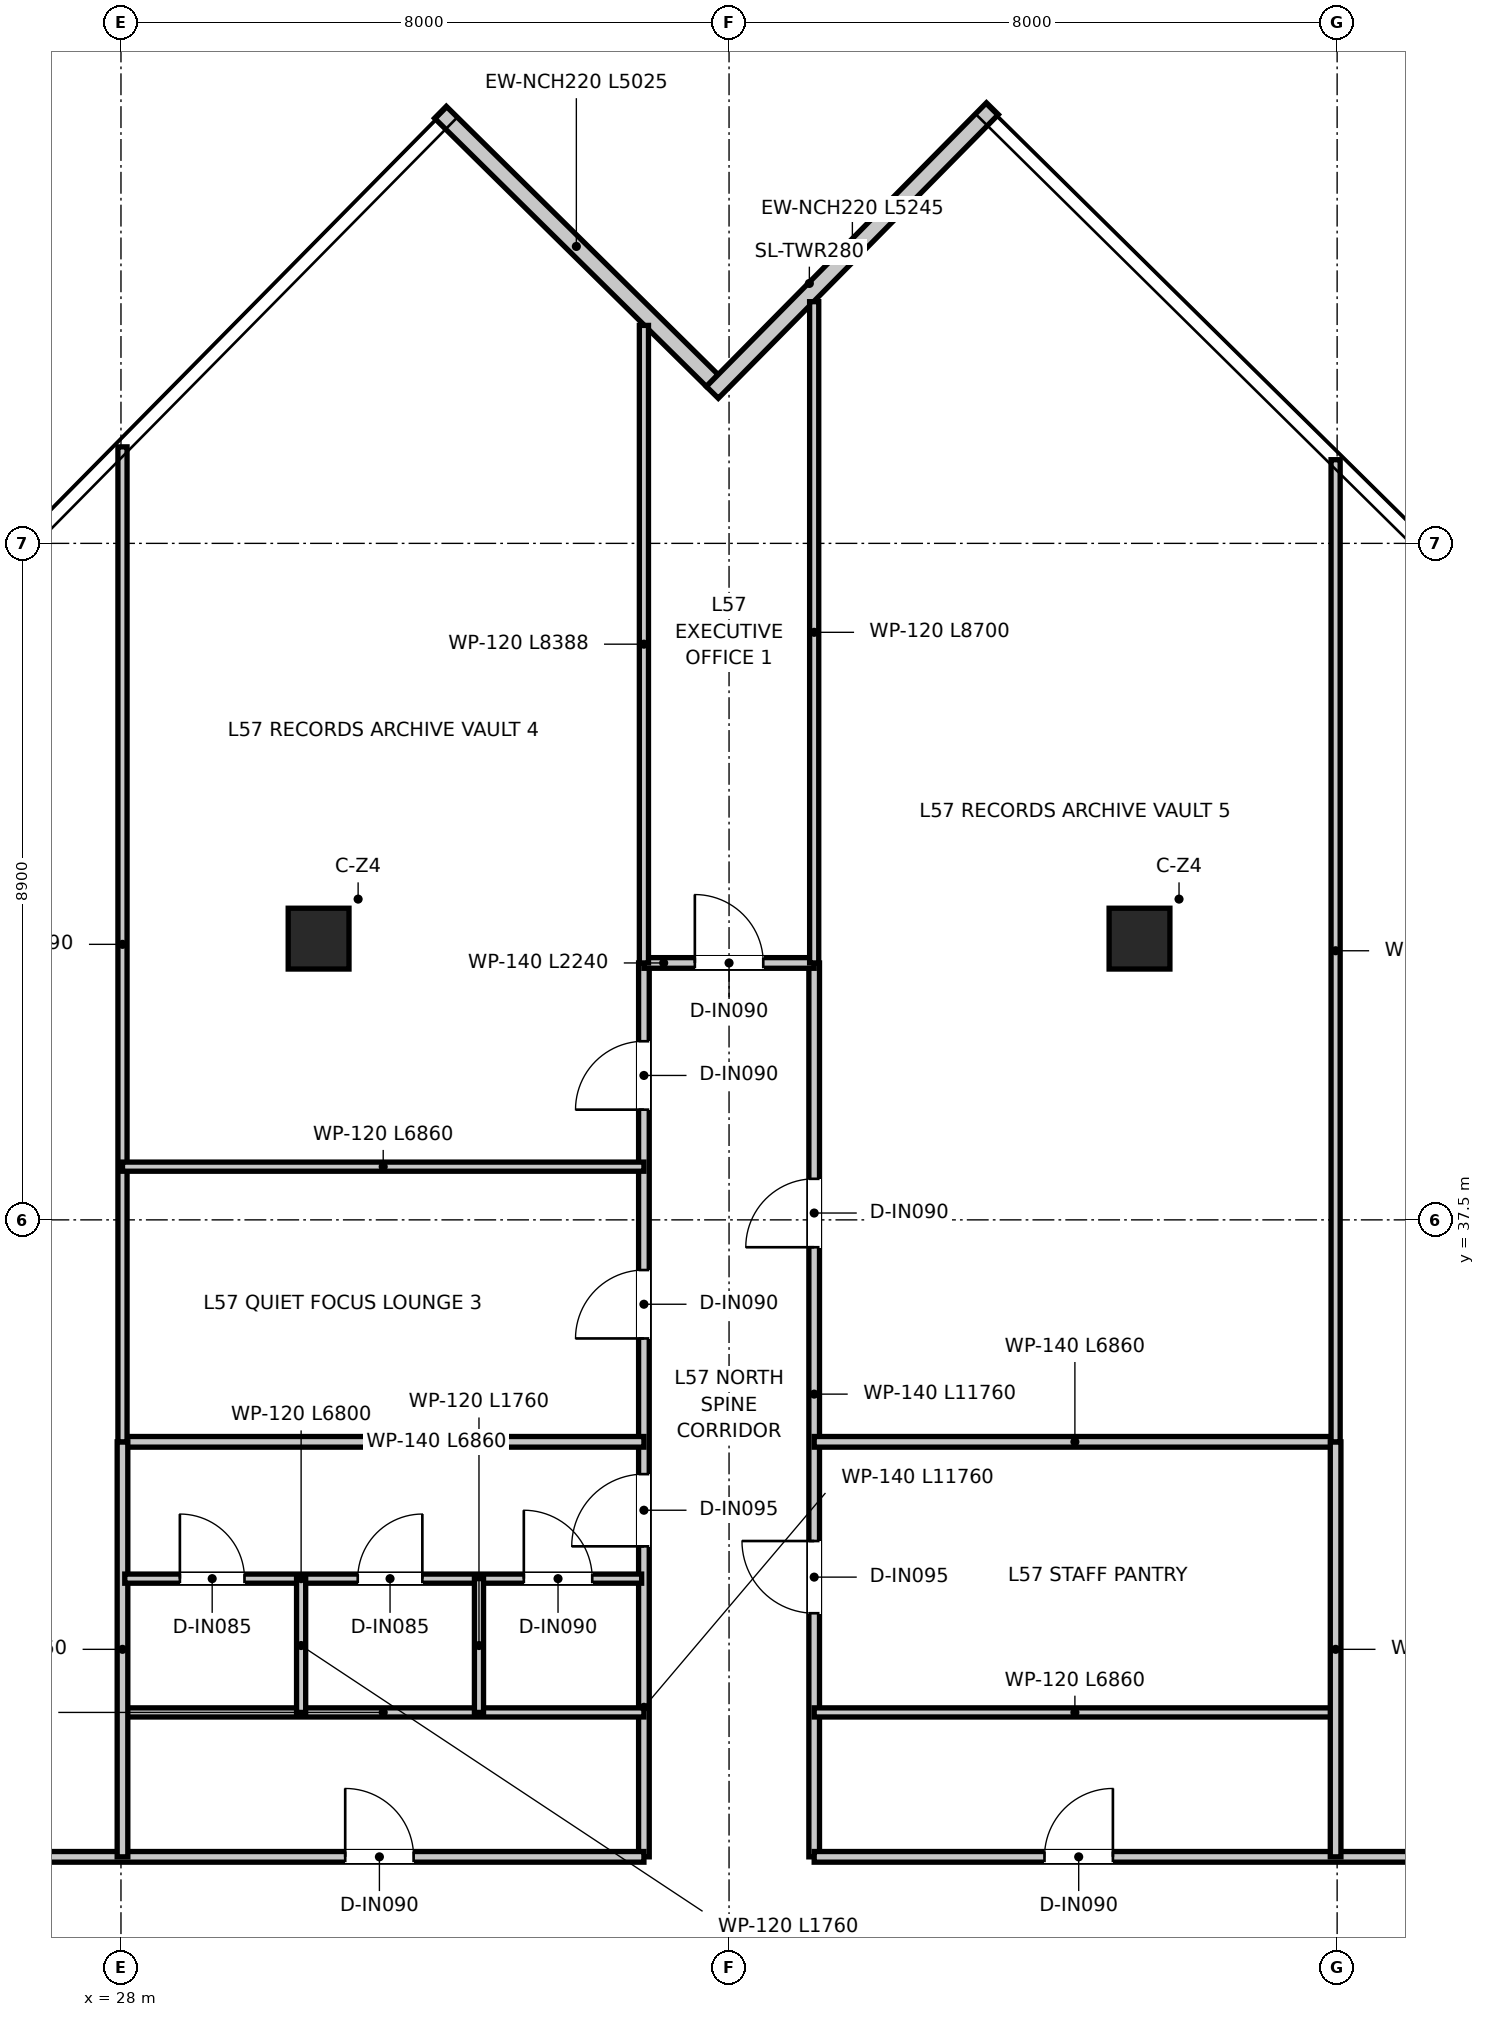
"""IFC4 building model, lengths in metres.
Left out: names, types, materials, properties, quantities, classifications, styles, units other than length and angle.
Written with IfcOpenShell. Run it as: python <this file> out.ifc"""

import sys

from ifc_helpers import new_model, si_unit, direction, frame, frame_2d, origin, origin_2d, place, context, subcontext, project, spatial, rectangle, extrude, source, transform, mapped, element, fill, save


model = new_model("IFC4")
c1 = context("Model", 3, precision=1e-05, world=origin(), true_north=direction((0.0, 1.0)))
c2 = subcontext(c1, "Body", "Model", "MODEL_VIEW")
j1 = project(units=[si_unit("LENGTHUNIT", "METRE"), si_unit("PLANEANGLEUNIT", "RADIAN")], contexts=[c1])
p1 = place(None, origin())
s1 = spatial("IfcSite", under=j1, at=p1, CompositionType="ELEMENT")
p2 = place(p1, origin())
s2 = spatial("IfcBuilding", under=s1, at=p2, CompositionType="ELEMENT")
p3 = place(p2, frame((0.0, 0.0, 234.95)))
s3 = spatial("IfcBuildingStorey", under=s2, at=p3, CompositionType="ELEMENT", Elevation=234.95)
m1 = source(origin(), c2, "Body", "SweptSolid", [
    extrude(rectangle(XDim=0.8, YDim=0.8, at=origin_2d()), origin(), (0.0, 0.0, 1.0), 3.95),
])
for number, where, z_axis, x_axis in (
    (1, (30.6, 41.2, 0.0), (0.0, 0.0, 1.0), (1.0, 0.0, 0.0)),
    (2, (41.4, 41.2, 0.0), (0.0, 0.0, 1.0), (1.0, 0.0, 0.0)),
):
    element("IfcColumn", number, at=place(p3, frame(where, z_axis=z_axis, x_axis=x_axis)), inside=s3, PredefinedType="COLUMN", context=c2, shape_type="MappedRepresentation", body=[
        mapped(m1, transform((0.0, 0.0, 0.0), x_axis=(1.0, 0.0, 0.0), y_axis=(0.0, 1.0, 0.0), z_axis=(0.0, 0.0, 1.0), scale=1.0)),
    ])
p4 = place(p3, frame((35.779, 48.542, 0.0), z_axis=(0.0, 0.0, 1.0), x_axis=(-0.711707198953, 0.70247623658, 0.0)))
e3 = element("IfcWall", 3, at=p4, inside=s3, PredefinedType="ELEMENTEDWALL", context=c2, shape_type="SweptSolid", body=[
    extrude(rectangle(XDim=5.025, YDim=0.22, at=frame_2d((2.513, 0.0))), origin(), (0.0, 0.0, 1.0), 3.67),
])
p5 = place(p3, frame((39.465, 52.119, 0.0), z_axis=(0.0, 0.0, 1.0), x_axis=(-0.702460059039, -0.711723166305, 0.0)))
e4 = element("IfcWall", 4, at=p5, inside=s3, PredefinedType="ELEMENTEDWALL", context=c2, shape_type="SweptSolid", body=[
    extrude(rectangle(XDim=5.245, YDim=0.22, at=frame_2d((2.623, 0.0))), origin(), (0.0, 0.0, 1.0), 3.67),
])
p6 = place(p3, frame((34.88, 29.12, 0.0), z_axis=(0.0, 0.0, 1.0), x_axis=(0.0, 1.0, 0.0)))
e5 = element("IfcWall", 5, at=p6, inside=s3, PredefinedType="PARTITIONING", context=c2, shape_type="SweptSolid", body=[
    extrude(rectangle(XDim=11.76, YDim=0.14, at=frame_2d((5.88, 0.0))), origin(), (0.0, 0.0, 1.0), 3.03),
])
p7 = place(p6, frame((4.085, 0.0, 0.0)))
e6 = element("IfcOpeningElement", 6, at=p7, cuts=e5, PredefinedType="OPENING", context=c2, shape_type="SweptSolid", body=[
    extrude(rectangle(XDim=0.95, YDim=2.1, at=frame_2d((0.475, 1.05))), frame((0.0, 0.08, 0.0), z_axis=(0.0, -1.0, 0.0), x_axis=(1.0, 0.0, 0.0)), (0.0, 0.0, 1.0), 0.16),
])
p8 = place(p6, frame((6.82, 0.0, 0.0)))
e7 = element("IfcOpeningElement", 7, at=p8, cuts=e5, PredefinedType="OPENING", context=c2, shape_type="SweptSolid", body=[
    extrude(rectangle(XDim=0.9, YDim=2.1, at=frame_2d((0.45, 1.05))), frame((0.0, 0.08, 0.0), z_axis=(0.0, -1.0, 0.0), x_axis=(1.0, 0.0, 0.0)), (0.0, 0.0, 1.0), 0.16),
])
p9 = place(p6, frame((9.83, 0.0, 0.0)))
e8 = element("IfcOpeningElement", 8, at=p9, cuts=e5, PredefinedType="OPENING", context=c2, shape_type="SweptSolid", body=[
    extrude(rectangle(XDim=0.9, YDim=2.1, at=frame_2d((0.45, 1.05))), frame((0.0, 0.08, 0.0), z_axis=(0.0, -1.0, 0.0), x_axis=(1.0, 0.0, 0.0)), (0.0, 0.0, 1.0), 0.16),
])
p10 = place(p3, frame((37.12, 29.12, 0.0), z_axis=(0.0, 0.0, 1.0), x_axis=(0.0, 1.0, 0.0)))
e9 = element("IfcWall", 9, at=p10, inside=s3, PredefinedType="PARTITIONING", context=c2, shape_type="SweptSolid", body=[
    extrude(rectangle(XDim=11.76, YDim=0.14, at=frame_2d((5.88, 0.0))), origin(), (0.0, 0.0, 1.0), 3.03),
])
p11 = place(p10, frame((3.205, 0.0, 0.0)))
e10 = element("IfcOpeningElement", 10, at=p11, cuts=e9, PredefinedType="OPENING", context=c2, shape_type="SweptSolid", body=[
    extrude(rectangle(XDim=0.95, YDim=2.1, at=frame_2d((0.475, 1.05))), frame((0.0, 0.08, 0.0), z_axis=(0.0, -1.0, 0.0), x_axis=(1.0, 0.0, 0.0)), (0.0, 0.0, 1.0), 0.16),
])
p12 = place(p10, frame((8.02, 0.0, 0.0)))
e11 = element("IfcOpeningElement", 11, at=p12, cuts=e9, PredefinedType="OPENING", context=c2, shape_type="SweptSolid", body=[
    extrude(rectangle(XDim=0.9, YDim=2.1, at=frame_2d((0.45, 1.05))), frame((0.0, 0.08, 0.0), z_axis=(0.0, -1.0, 0.0), x_axis=(1.0, 0.0, 0.0)), (0.0, 0.0, 1.0), 0.16),
])
p13 = place(p3, frame((34.88, 40.88, 0.0), z_axis=(0.0, 0.0, 1.0), x_axis=(1.0, 0.0, 0.0)))
e12 = element("IfcWall", 12, at=p13, inside=s3, PredefinedType="PARTITIONING", context=c2, shape_type="SweptSolid", body=[
    extrude(rectangle(XDim=2.24, YDim=0.14, at=frame_2d((1.12, 0.0))), origin(), (0.0, 0.0, 1.0), 3.67),
])
p14 = place(p13, frame((0.67, 0.0, 0.0)))
e13 = element("IfcOpeningElement", 13, at=p14, cuts=e12, PredefinedType="OPENING", context=c2, shape_type="SweptSolid", body=[
    extrude(rectangle(XDim=0.9, YDim=2.1, at=frame_2d((0.45, 1.05))), frame((0.0, 0.08, 0.0), z_axis=(0.0, -1.0, 0.0), x_axis=(1.0, 0.0, 0.0)), (0.0, 0.0, 1.0), 0.16),
])
p15 = place(p3, frame((11.803, 29.12, 0.0), z_axis=(0.0, 0.0, 1.0), x_axis=(1.0, 0.0, 0.0)))
e14 = element("IfcWall", 14, at=p15, inside=s3, PredefinedType="PARTITIONING", context=c2, shape_type="SweptSolid", body=[
    extrude(rectangle(XDim=23.077, YDim=0.14, at=frame_2d((11.538, 0.0))), origin(), (0.0, 0.0, 1.0), 3.03),
])
p16 = place(p15, frame((19.147, 0.0, 0.0)))
e15 = element("IfcOpeningElement", 15, at=p16, cuts=e14, PredefinedType="OPENING", context=c2, shape_type="SweptSolid", body=[
    extrude(rectangle(XDim=0.9, YDim=2.1, at=frame_2d((0.45, 1.05))), frame((0.0, 0.08, 0.0), z_axis=(0.0, -1.0, 0.0), x_axis=(1.0, 0.0, 0.0)), (0.0, 0.0, 1.0), 0.16),
])
p17 = place(p15, frame((7.363, 0.0, 0.0)))
e16 = element("IfcOpeningElement", 16, at=p17, cuts=e14, PredefinedType="OPENING", context=c2, shape_type="SweptSolid", body=[
    extrude(rectangle(XDim=0.9, YDim=2.1, at=frame_2d((0.45, 1.05))), frame((0.0, 0.08, 0.0), z_axis=(0.0, -1.0, 0.0), x_axis=(1.0, 0.0, 0.0)), (0.0, 0.0, 1.0), 0.16),
])
p18 = place(p3, frame((37.12, 29.12, 0.0), z_axis=(0.0, 0.0, 1.0), x_axis=(1.0, 0.0, 0.0)))
e17 = element("IfcWall", 17, at=p18, inside=s3, PredefinedType="PARTITIONING", context=c2, shape_type="SweptSolid", body=[
    extrude(rectangle(XDim=22.73, YDim=0.14, at=frame_2d((11.365, 0.0))), origin(), (0.0, 0.0, 1.0), 3.03),
])
p19 = place(p18, frame((3.03, 0.0, 0.0)))
e18 = element("IfcOpeningElement", 18, at=p19, cuts=e17, PredefinedType="OPENING", context=c2, shape_type="SweptSolid", body=[
    extrude(rectangle(XDim=0.9, YDim=2.1, at=frame_2d((0.45, 1.05))), frame((0.0, 0.08, 0.0), z_axis=(0.0, -1.0, 0.0), x_axis=(1.0, 0.0, 0.0)), (0.0, 0.0, 1.0), 0.16),
])
p20 = place(p18, frame((14.604, 0.0, 0.0)))
e19 = element("IfcOpeningElement", 19, at=p20, cuts=e17, PredefinedType="OPENING", context=c2, shape_type="SweptSolid", body=[
    extrude(rectangle(XDim=0.9, YDim=2.1, at=frame_2d((0.45, 1.05))), frame((0.0, 0.08, 0.0), z_axis=(0.0, -1.0, 0.0), x_axis=(1.0, 0.0, 0.0)), (0.0, 0.0, 1.0), 0.16),
])
for number, where, z_axis, x_axis in (
    (20, (28.02, 31.02, 0.0), (0.0, 0.0, 1.0), (1.0, 0.0, 0.0)),
    (21, (37.12, 31.02, 0.0), (0.0, 0.0, 1.0), (1.0, 0.0, 0.0)),
):
    element("IfcWall", number, at=place(p3, frame(where, z_axis=z_axis, x_axis=x_axis)), inside=s3, PredefinedType="PARTITIONING", context=c2, shape_type="SweptSolid", body=[
        extrude(rectangle(XDim=6.86, YDim=0.12, at=frame_2d((3.43, 0.0))), origin(), (0.0, 0.0, 1.0), 3.18),
    ])
for number, where, z_axis, x_axis in (
    (22, (28.02, 34.58, 0.0), (0.0, 0.0, 1.0), (1.0, 0.0, 0.0)),
    (23, (37.12, 34.58, 0.0), (0.0, 0.0, 1.0), (1.0, 0.0, 0.0)),
):
    element("IfcWall", number, at=place(p3, frame(where, z_axis=z_axis, x_axis=x_axis)), inside=s3, PredefinedType="PARTITIONING", context=c2, shape_type="SweptSolid", body=[
        extrude(rectangle(XDim=6.86, YDim=0.14, at=frame_2d((3.43, 0.0))), origin(), (0.0, 0.0, 1.0), 3.18),
    ])
for number, where, z_axis, x_axis in (
    (24, (28.02, 29.12, 0.0), (0.0, 0.0, 1.0), (0.0, 1.0, 0.0)),
    (25, (43.98, 29.12, 0.0), (0.0, 0.0, 1.0), (0.0, 1.0, 0.0)),
):
    element("IfcWall", number, at=place(p3, frame(where, z_axis=z_axis, x_axis=x_axis)), inside=s3, PredefinedType="PARTITIONING", context=c2, shape_type="SweptSolid", body=[
        extrude(rectangle(XDim=5.46, YDim=0.14, at=frame_2d((2.73, 0.0))), origin(), (0.0, 0.0, 1.0), 3.37),
    ])
p21 = place(p3, frame((28.05, 32.78, 0.0), z_axis=(0.0, 0.0, 1.0), x_axis=(1.0, 0.0, 0.0)))
e26 = element("IfcWall", 26, at=p21, inside=s3, PredefinedType="PARTITIONING", context=c2, shape_type="SweptSolid", body=[
    extrude(rectangle(XDim=6.8, YDim=0.12, at=frame_2d((3.4, 0.0))), origin(), (0.0, 0.0, 1.0), 3.18),
])
p22 = place(p21, frame((0.725, 0.0, 0.0)))
e27 = element("IfcOpeningElement", 27, at=p22, cuts=e26, PredefinedType="OPENING", context=c2, shape_type="SweptSolid", body=[
    extrude(rectangle(XDim=0.85, YDim=2.1, at=frame_2d((0.425, 1.05))), frame((0.0, 0.07, 0.0), z_axis=(0.0, -1.0, 0.0), x_axis=(1.0, 0.0, 0.0)), (0.0, 0.0, 1.0), 0.14),
])
p23 = place(p21, frame((3.065, 0.0, 0.0)))
e28 = element("IfcOpeningElement", 28, at=p23, cuts=e26, PredefinedType="OPENING", context=c2, shape_type="SweptSolid", body=[
    extrude(rectangle(XDim=0.85, YDim=2.1, at=frame_2d((0.425, 1.05))), frame((0.0, 0.07, 0.0), z_axis=(0.0, -1.0, 0.0), x_axis=(1.0, 0.0, 0.0)), (0.0, 0.0, 1.0), 0.14),
])
p24 = place(p21, frame((5.25, 0.0, 0.0)))
e29 = element("IfcOpeningElement", 29, at=p24, cuts=e26, PredefinedType="OPENING", context=c2, shape_type="SweptSolid", body=[
    extrude(rectangle(XDim=0.9, YDim=2.1, at=frame_2d((0.45, 1.05))), frame((0.0, 0.07, 0.0), z_axis=(0.0, -1.0, 0.0), x_axis=(1.0, 0.0, 0.0)), (0.0, 0.0, 1.0), 0.14),
])
p25 = place(p3, frame((30.37, 31.02, 0.0), z_axis=(0.0, 0.0, 1.0), x_axis=(0.0, 1.0, 0.0)))
e30 = element("IfcWall", 30, at=p25, inside=s3, PredefinedType="PARTITIONING", context=c2, shape_type="SweptSolid", body=[
    extrude(rectangle(XDim=1.76, YDim=0.12, at=frame_2d((0.88, 0.0))), origin(), (0.0, 0.0, 1.0), 3.18),
])
p26 = place(p3, frame((32.71, 31.02, 0.0), z_axis=(0.0, 0.0, 1.0), x_axis=(0.0, 1.0, 0.0)))
e31 = element("IfcWall", 31, at=p26, inside=s3, PredefinedType="PARTITIONING", context=c2, shape_type="SweptSolid", body=[
    extrude(rectangle(XDim=1.76, YDim=0.12, at=frame_2d((0.88, 0.0))), origin(), (0.0, 0.0, 1.0), 3.67),
])
p27 = place(p3, frame((34.88, 40.88, 0.0), z_axis=(0.0, 0.0, 1.0), x_axis=(0.0, 1.0, 0.0)))
e32 = element("IfcWall", 32, at=p27, inside=s3, PredefinedType="PARTITIONING", context=c2, shape_type="SweptSolid", body=[
    extrude(rectangle(XDim=8.388, YDim=0.12, at=frame_2d((4.194, 0.0))), origin(), (0.0, 0.0, 1.0), 3.28),
])
p28 = place(p3, frame((37.12, 40.88, 0.0), z_axis=(0.0, 0.0, 1.0), x_axis=(0.0, 1.0, 0.0)))
e33 = element("IfcWall", 33, at=p28, inside=s3, PredefinedType="PARTITIONING", context=c2, shape_type="SweptSolid", body=[
    extrude(rectangle(XDim=8.7, YDim=0.12, at=frame_2d((4.35, 0.0))), origin(), (0.0, 0.0, 1.0), 3.28),
])
p29 = place(p3, frame((28.02, 34.58, 0.0), z_axis=(0.0, 0.0, 1.0), x_axis=(0.0, 1.0, 0.0)))
e34 = element("IfcWall", 34, at=p29, inside=s3, PredefinedType="PARTITIONING", context=c2, shape_type="SweptSolid", body=[
    extrude(rectangle(XDim=13.09, YDim=0.12, at=frame_2d((6.545, 0.0))), origin(), (0.0, 0.0, 1.0), 3.03),
])
p30 = place(p3, frame((43.98, 34.58, 0.0), z_axis=(0.0, 0.0, 1.0), x_axis=(0.0, 1.0, 0.0)))
e35 = element("IfcWall", 35, at=p30, inside=s3, PredefinedType="PARTITIONING", context=c2, shape_type="SweptSolid", body=[
    extrude(rectangle(XDim=12.921, YDim=0.12, at=frame_2d((6.46, 0.0))), origin(), (0.0, 0.0, 1.0), 3.03),
])
p31 = place(p3, frame((28.02, 38.2, 0.0), z_axis=(0.0, 0.0, 1.0), x_axis=(1.0, 0.0, 0.0)))
e36 = element("IfcWall", 36, at=p31, inside=s3, PredefinedType="PARTITIONING", context=c2, shape_type="SweptSolid", body=[
    extrude(rectangle(XDim=6.86, YDim=0.12, at=frame_2d((3.43, 0.0))), origin(), (0.0, 0.0, 1.0), 3.18),
])
p32 = place(p16, origin())
e37 = element("IfcDoor", 37, at=p32, inside=s3, OperationType="SINGLE_SWING_LEFT", PredefinedType="DOOR", context=c2, shape_type="SweptSolid", body=[
    extrude(rectangle(XDim=0.9, YDim=2.1, at=frame_2d((0.45, 1.05))), frame((0.0, 0.025, 0.0), z_axis=(0.0, -1.0, 0.0), x_axis=(1.0, 0.0, 0.0)), (0.0, 0.0, 1.0), 0.05),
])
fill(e15, e37)
p33 = place(p19, origin())
e38 = element("IfcDoor", 38, at=p33, inside=s3, OperationType="SINGLE_SWING_RIGHT", PredefinedType="DOOR", context=c2, shape_type="SweptSolid", body=[
    extrude(rectangle(XDim=0.9, YDim=2.1, at=frame_2d((0.45, 1.05))), frame((0.0, 0.025, 0.0), z_axis=(0.0, -1.0, 0.0), x_axis=(1.0, 0.0, 0.0)), (0.0, 0.0, 1.0), 0.05),
])
fill(e18, e38)
p34 = place(p7, origin())
e39 = element("IfcDoor", 39, at=p34, inside=s3, OperationType="SINGLE_SWING_LEFT", PredefinedType="DOOR", context=c2, shape_type="SweptSolid", body=[
    extrude(rectangle(XDim=0.95, YDim=2.1, at=frame_2d((0.475, 1.05))), frame((0.0, 0.025, 0.0), z_axis=(0.0, -1.0, 0.0), x_axis=(1.0, 0.0, 0.0)), (0.0, 0.0, 1.0), 0.05),
])
fill(e6, e39)
p35 = place(p11, origin())
e40 = element("IfcDoor", 40, at=p35, inside=s3, OperationType="SINGLE_SWING_RIGHT", PredefinedType="DOOR", context=c2, shape_type="SweptSolid", body=[
    extrude(rectangle(XDim=0.95, YDim=2.1, at=frame_2d((0.475, 1.05))), frame((0.0, 0.025, 0.0), z_axis=(0.0, -1.0, 0.0), x_axis=(1.0, 0.0, 0.0)), (0.0, 0.0, 1.0), 0.05),
])
fill(e10, e40)
p36 = place(p22, origin())
e41 = element("IfcDoor", 41, at=p36, inside=s3, OperationType="SINGLE_SWING_LEFT", PredefinedType="DOOR", context=c2, shape_type="SweptSolid", body=[
    extrude(rectangle(XDim=0.85, YDim=2.1, at=frame_2d((0.425, 1.05))), frame((0.0, 0.025, 0.0), z_axis=(0.0, -1.0, 0.0), x_axis=(1.0, 0.0, 0.0)), (0.0, 0.0, 1.0), 0.05),
])
fill(e27, e41)
p37 = place(p23, origin())
e42 = element("IfcDoor", 42, at=p37, inside=s3, OperationType="SINGLE_SWING_RIGHT", PredefinedType="DOOR", context=c2, shape_type="SweptSolid", body=[
    extrude(rectangle(XDim=0.85, YDim=2.1, at=frame_2d((0.425, 1.05))), frame((0.0, 0.025, 0.0), z_axis=(0.0, -1.0, 0.0), x_axis=(1.0, 0.0, 0.0)), (0.0, 0.0, 1.0), 0.05),
])
fill(e28, e42)
p38 = place(p24, origin())
e43 = element("IfcDoor", 43, at=p38, inside=s3, OperationType="SINGLE_SWING_LEFT", PredefinedType="DOOR", context=c2, shape_type="SweptSolid", body=[
    extrude(rectangle(XDim=0.9, YDim=2.1, at=frame_2d((0.45, 1.05))), frame((0.0, 0.025, 0.0), z_axis=(0.0, -1.0, 0.0), x_axis=(1.0, 0.0, 0.0)), (0.0, 0.0, 1.0), 0.05),
])
fill(e29, e43)
p39 = place(p14, origin())
e44 = element("IfcDoor", 44, at=p39, inside=s3, OperationType="SINGLE_SWING_LEFT", PredefinedType="DOOR", context=c2, shape_type="SweptSolid", body=[
    extrude(rectangle(XDim=0.9, YDim=2.1, at=frame_2d((0.45, 1.05))), frame((0.0, 0.025, 0.0), z_axis=(0.0, -1.0, 0.0), x_axis=(1.0, 0.0, 0.0)), (0.0, 0.0, 1.0), 0.05),
])
fill(e13, e44)
p40 = place(p8, origin())
e45 = element("IfcDoor", 45, at=p40, inside=s3, OperationType="SINGLE_SWING_LEFT", PredefinedType="DOOR", context=c2, shape_type="SweptSolid", body=[
    extrude(rectangle(XDim=0.9, YDim=2.1, at=frame_2d((0.45, 1.05))), frame((0.0, 0.025, 0.0), z_axis=(0.0, -1.0, 0.0), x_axis=(1.0, 0.0, 0.0)), (0.0, 0.0, 1.0), 0.05),
])
fill(e7, e45)
p41 = place(p9, origin())
e46 = element("IfcDoor", 46, at=p41, inside=s3, OperationType="SINGLE_SWING_LEFT", PredefinedType="DOOR", context=c2, shape_type="SweptSolid", body=[
    extrude(rectangle(XDim=0.9, YDim=2.1, at=frame_2d((0.45, 1.05))), frame((0.0, 0.025, 0.0), z_axis=(0.0, -1.0, 0.0), x_axis=(1.0, 0.0, 0.0)), (0.0, 0.0, 1.0), 0.05),
])
fill(e8, e46)
p42 = place(p12, origin())
e47 = element("IfcDoor", 47, at=p42, inside=s3, OperationType="SINGLE_SWING_LEFT", PredefinedType="DOOR", context=c2, shape_type="SweptSolid", body=[
    extrude(rectangle(XDim=0.9, YDim=2.1, at=frame_2d((0.45, 1.05))), frame((0.0, 0.025, 0.0), z_axis=(0.0, -1.0, 0.0), x_axis=(1.0, 0.0, 0.0)), (0.0, 0.0, 1.0), 0.05),
])
fill(e11, e47)
save(model, sys.argv[1])
